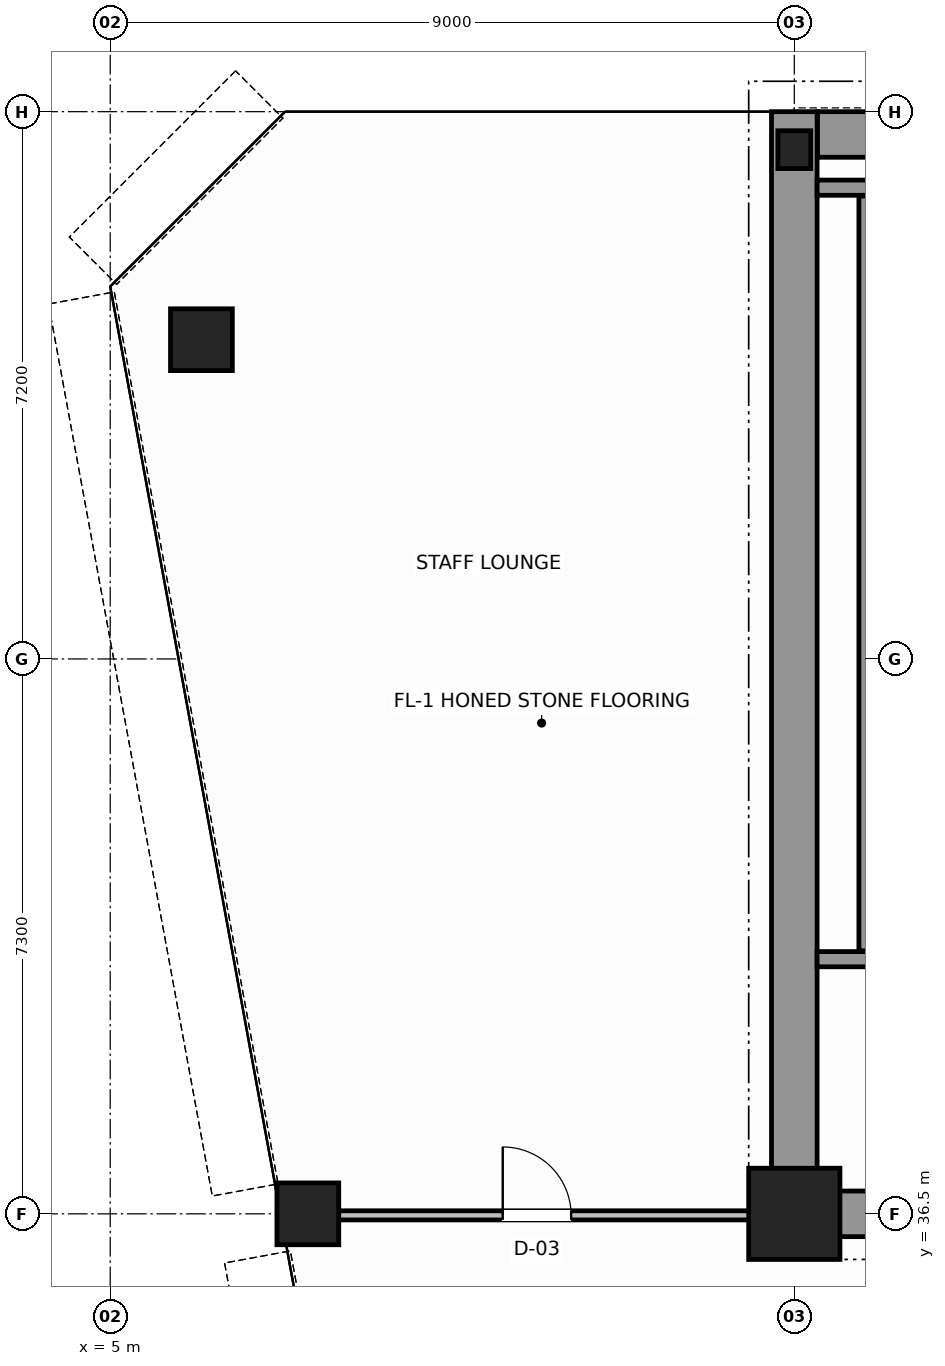
"""IFC4 building model, lengths in metres.
Left out: names, types, materials, properties, quantities, classifications, styles, units other than length and angle.
Written with IfcOpenShell. Run it as: python <this file> out.ifc"""

import sys

from ifc_helpers import new_model, si_unit, direction, frame, frame_2d, origin, origin_2d, place, context, subcontext, project, spatial, rectangle, hollow_circle, i_section, extrude, source, transform, mapped, element, fill, save


model = new_model("IFC4")
c1 = context("Model", 3, precision=1e-05, world=origin(), true_north=direction((0.0, 1.0)))
c2 = subcontext(c1, "Body", "Model", "MODEL_VIEW")
j1 = project(units=[si_unit("LENGTHUNIT", "METRE"), si_unit("PLANEANGLEUNIT", "RADIAN")], contexts=[c1])
p1 = place(None, origin())
s1 = spatial("IfcSite", under=j1, at=p1, CompositionType="ELEMENT")
p2 = place(p1, origin())
s2 = spatial("IfcBuilding", under=s1, at=p2, CompositionType="ELEMENT")
p3 = place(p2, frame((0.0, 0.0, 184.2)))
s3 = spatial("IfcBuildingStorey", under=s2, at=p3, CompositionType="ELEMENT", Elevation=184.2)
m1 = source(origin(), c2, "Body", "SweptSolid", [
    extrude(rectangle(XDim=1.2, YDim=1.2, at=origin_2d()), origin(), (0.0, 0.0, 1.0), 3.8),
])
p4 = place(p3, frame((14.0, 36.5, 0.0), z_axis=(0.0, 0.0, 1.0), x_axis=(1.0, 0.0, 0.0)))
e1 = element("IfcColumn", 1, at=p4, inside=s3, PredefinedType="COLUMN", context=c2, shape_type="MappedRepresentation", body=[
    mapped(m1, transform((0.0, 0.0, 0.0), scale=1.0)),
])
m2 = source(origin(), c2, "Body", "SweptSolid", [
    extrude(i_section(OverallWidth=0.432, OverallDepth=0.498, WebThickness=0.055, FlangeThickness=0.068, FilletRadius=0.015, at=origin_2d()), origin(), (0.0, 0.0, 1.0), 3.8),
])
p5 = place(p3, frame((14.0, 50.5, 0.0), z_axis=(0.0, 0.0, 1.0), x_axis=(1.0, 0.0, 0.0)))
e2 = element("IfcColumn", 2, at=p5, inside=s3, PredefinedType="COLUMN", context=c2, shape_type="MappedRepresentation", body=[
    mapped(m2, transform((0.0, 0.0, 0.0), scale=1.0)),
])
m3 = source(origin(), c2, "Body", "SweptSolid", [
    extrude(hollow_circle(Radius=0.406, WallThickness=0.04, at=origin_2d()), origin(), (0.0, 0.0, 1.0), 3.8),
])
for number, where, z_axis, x_axis in (
    (3, (6.2, 48.0, 0.0), (0.0, 0.0, 1.0), (1.0, 0.0, 0.0)),
    (4, (7.6, 36.5, 0.0), (0.0, 0.0, 1.0), (1.0, 0.0, 0.0)),
):
    element("IfcColumn", number, at=place(p3, frame(where, z_axis=z_axis, x_axis=x_axis)), inside=s3, PredefinedType="COLUMN", context=c2, shape_type="MappedRepresentation", body=[
        mapped(m3, transform((0.0, 0.0, 0.0), scale=1.0)),
    ])
p6 = place(p3, frame((14.304, 50.7, 0.0), z_axis=(0.0, 0.0, 1.0), x_axis=(1.0, 0.0, 0.0)))
e5 = element("IfcWall", 5, at=p6, inside=s3, PredefinedType="SHEAR", context=c2, shape_type="SweptSolid", body=[
    extrude(rectangle(XDim=19.694, YDim=0.6, at=frame_2d((9.847, 0.0))), origin(), (0.0, 0.0, 1.0), 3.8),
])
p7 = place(p3, frame((14.0, 36.5, 0.0), z_axis=(0.0, 0.0, 1.0), x_axis=(0.0, 1.0, 0.0)))
e6 = element("IfcWall", 6, at=p7, inside=s3, PredefinedType="SHEAR", context=c2, shape_type="SweptSolid", body=[
    extrude(rectangle(XDim=14.5, YDim=0.6, at=frame_2d((7.25, 0.0))), origin(), (0.0, 0.0, 1.0), 3.8),
])
p8 = place(p3, frame((14.32, 36.5, 0.0), z_axis=(0.0, 0.0, 1.0), x_axis=(1.0, 0.0, 0.0)))
e7 = element("IfcWall", 7, at=p8, inside=s3, PredefinedType="SHEAR", context=c2, shape_type="SweptSolid", body=[
    extrude(rectangle(XDim=3.88, YDim=0.6, at=frame_2d((1.94, 0.0))), origin(), (0.0, 0.0, 1.0), 2.58),
])
p9 = place(p3, frame((14.3, 39.85, 0.0), z_axis=(0.0, 0.0, 1.0), x_axis=(1.0, 0.0, 0.0)))
e8 = element("IfcWall", 8, at=p9, inside=s3, PredefinedType="SOLIDWALL", context=c2, shape_type="SweptSolid", body=[
    extrude(rectangle(XDim=4.3, YDim=0.2, at=frame_2d((2.15, 0.0))), origin(), (0.0, 0.0, 1.0), 3.8),
])
p10 = place(p9, frame((1.875, 0.0, 0.0)))
e9 = element("IfcOpeningElement", 9, at=p10, cuts=e8, PredefinedType="OPENING", context=c2, shape_type="SweptSolid", body=[
    extrude(rectangle(XDim=1.1, YDim=2.15, at=frame_2d((0.55, 1.075))), frame((0.0, 0.11, 0.0), z_axis=(0.0, -1.0, 0.0), x_axis=(1.0, 0.0, 0.0)), (0.0, 0.0, 1.0), 0.22),
])
p11 = place(p3, frame((14.3, 50.0, 0.0), z_axis=(0.0, 0.0, 1.0), x_axis=(1.0, 0.0, 0.0)))
e10 = element("IfcWall", 10, at=p11, inside=s3, PredefinedType="SOLIDWALL", context=c2, shape_type="SweptSolid", body=[
    extrude(rectangle(XDim=4.3, YDim=0.2, at=frame_2d((2.15, 0.0))), origin(), (0.0, 0.0, 1.0), 3.8),
])
p12 = place(p3, frame((14.95, 39.96, 0.0), z_axis=(0.0, 0.0, 1.0), x_axis=(0.0, 1.0, 0.0)))
e11 = element("IfcWall", 11, at=p12, inside=s3, PredefinedType="SOLIDWALL", context=c2, shape_type="SweptSolid", body=[
    extrude(rectangle(XDim=9.93, YDim=0.2, at=frame_2d((4.965, 0.0))), origin(), (0.0, 0.0, 1.0), 3.8),
])
p13 = place(p3, frame((7.289, 36.48, 0.0), z_axis=(0.0, 0.0, 1.0), x_axis=(1.0, 0.0, 0.0)))
e12 = element("IfcWall", 12, at=p13, inside=s3, PredefinedType="PARTITIONING", context=c2, shape_type="SweptSolid", body=[
    extrude(rectangle(XDim=6.651, YDim=0.12, at=frame_2d((3.325, 0.0))), origin(), (0.0, 0.0, 1.0), 2.97),
])
p14 = place(p13, frame((2.875, 0.0, 0.0)))
e13 = element("IfcOpeningElement", 13, at=p14, cuts=e12, PredefinedType="OPENING", context=c2, shape_type="SweptSolid", body=[
    extrude(rectangle(XDim=0.9, YDim=2.15, at=frame_2d((0.45, 1.075))), frame((0.0, 0.07, 0.0), z_axis=(0.0, -1.0, 0.0), x_axis=(1.0, 0.0, 0.0)), (0.0, 0.0, 1.0), 0.14),
])
m4 = source(origin(), c2, "Body", "SweptSolid", [
    extrude(rectangle(XDim=0.9, YDim=2.15, at=frame_2d((0.45, 1.075))), frame((0.0, 0.025, 0.0), z_axis=(0.0, -1.0, 0.0), x_axis=(1.0, 0.0, 0.0)), (0.0, 0.0, 1.0), 0.05),
])
p15 = place(p14, origin())
e14 = element("IfcDoor", 14, at=p15, inside=s3, OperationType="SINGLE_SWING_LEFT", PredefinedType="DOOR", context=c2, shape_type="MappedRepresentation", body=[
    mapped(m4, transform((0.0, 0.0, 0.0), scale=1.0)),
])
fill(e13, e14)
save(model, sys.argv[1])
